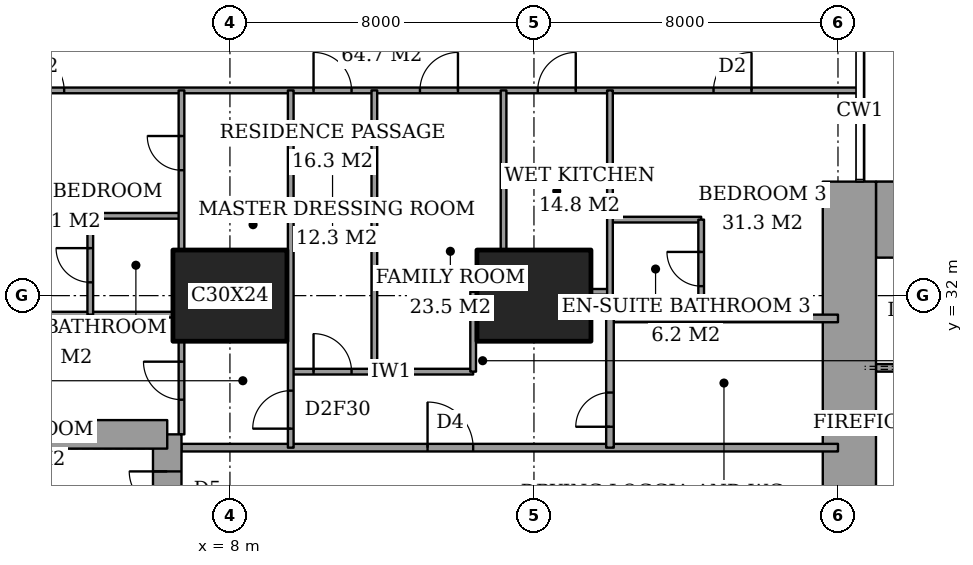
"""IFC4 building model, lengths in metres.
Left out: names, types, materials, properties, quantities, classifications, styles, units other than length and angle.
Written with IfcOpenShell. Run it as: python <this file> out.ifc"""

import sys

from ifc_helpers import new_model, si_unit, direction, frame, frame_2d, origin, origin_2d, place, context, subcontext, project, spatial, rectangle, extrude, element, fill, save


model = new_model("IFC4")
c1 = context("Model", 3, precision=1e-05, world=origin(), true_north=direction((0.0, 1.0)))
c2 = subcontext(c1, "Body", "Model", "MODEL_VIEW")
j1 = project(units=[si_unit("LENGTHUNIT", "METRE"), si_unit("PLANEANGLEUNIT", "RADIAN")], contexts=[c1])
p1 = place(None, origin())
s1 = spatial("IfcSite", under=j1, at=p1, CompositionType="ELEMENT")
p2 = place(p1, origin())
s2 = spatial("IfcBuilding", under=s1, at=p2, CompositionType="ELEMENT")
p3 = place(p2, frame((0.0, 0.0, 143.0)))
s3 = spatial("IfcBuildingStorey", under=s2, at=p3, CompositionType="ELEMENT", Elevation=143.0)
for number, where, z_axis, x_axis in (
    (1, (8.0, 32.0, 0.0), (0.0, 0.0, 1.0), (1.0, 0.0, 0.0)),
    (2, (16.0, 32.0, 0.0), (0.0, 0.0, 1.0), (1.0, 0.0, 0.0)),
):
    element("IfcColumn", number, at=place(p3, frame(where, z_axis=z_axis, x_axis=x_axis)), inside=s3, PredefinedType="COLUMN", context=c2, shape_type="SweptSolid", body=[
        extrude(rectangle(XDim=3.0, YDim=2.4, at=origin_2d()), origin(), (0.0, 0.0, 1.0), 3.6),
    ])
p4 = place(p3, frame((25.0, 34.0, 0.0), z_axis=(0.0, 0.0, 1.0), x_axis=(1.0, 0.0, 0.0)))
e3 = element("IfcWall", 3, at=p4, inside=s3, PredefinedType="SHEAR", context=c2, shape_type="SweptSolid", body=[
    extrude(rectangle(XDim=3.15, YDim=2.0, at=frame_2d((1.575, 0.0))), origin(), (0.0, 0.0, 1.0), 3.6),
])
p5 = place(p3, frame((24.3, 23.15, 0.0), z_axis=(0.0, 0.0, 1.0), x_axis=(0.0, 1.0, 0.0)))
e4 = element("IfcWall", 4, at=p5, inside=s3, PredefinedType="SHEAR", context=c2, shape_type="SweptSolid", body=[
    extrude(rectangle(XDim=11.85, YDim=1.4, at=frame_2d((5.925, 0.0))), origin(), (0.0, 0.0, 1.0), 3.6),
])
p6 = place(p5, frame((0.75, 0.0, 0.0)))
e5 = element("IfcOpeningElement", 5, at=p6, cuts=e4, PredefinedType="OPENING", context=c2, shape_type="SweptSolid", body=[
    extrude(rectangle(XDim=1.8, YDim=2.4, at=frame_2d((0.9, 1.2))), frame((0.0, 0.71, 0.0), z_axis=(0.0, -1.0, 0.0), x_axis=(1.0, 0.0, 0.0)), (0.0, 0.0, 1.0), 1.42),
])
p7 = place(p3, frame((6.35, 19.65, 0.0), z_axis=(0.0, 0.0, 1.0), x_axis=(0.0, 1.0, 0.0)))
e6 = element("IfcWall", 6, at=p7, inside=s3, PredefinedType="SHEAR", context=c2, shape_type="SweptSolid", body=[
    extrude(rectangle(XDim=8.7, YDim=0.75, at=frame_2d((4.35, 0.0))), origin(), (0.0, 0.0, 1.0), 3.6),
])
p8 = place(p7, frame((6.725, 0.0, 0.0)))
e7 = element("IfcOpeningElement", 7, at=p8, cuts=e6, PredefinedType="OPENING", context=c2, shape_type="SweptSolid", body=[
    extrude(rectangle(XDim=1.0, YDim=2.1, at=frame_2d((0.5, 1.05))), frame((0.0, 0.385, 0.0), z_axis=(0.0, -1.0, 0.0), x_axis=(1.0, 0.0, 0.0)), (0.0, 0.0, 1.0), 0.77),
])
p9 = place(p3, frame((6.35, 28.35, 0.0), z_axis=(0.0, 0.0, 1.0), x_axis=(-1.0, 0.0, 0.0)))
e8 = element("IfcWall", 8, at=p9, inside=s3, PredefinedType="SHEAR", context=c2, shape_type="SweptSolid", body=[
    extrude(rectangle(XDim=4.45, YDim=0.75, at=frame_2d((2.225, 0.0))), origin(), (0.0, 0.0, 1.0), 3.6),
])
p10 = place(p3, frame((6.725, 28.0, 0.0), z_axis=(0.0, 0.0, 1.0), x_axis=(1.0, 0.0, 0.0)))
e9 = element("IfcWall", 9, at=p10, inside=s3, PredefinedType="PARTITIONING", context=c2, shape_type="SweptSolid", body=[
    extrude(rectangle(XDim=17.275, YDim=0.2, at=frame_2d((8.637, 0.0))), origin(), (0.0, 0.0, 1.0), 3.35),
])
p11 = place(p10, frame((6.475, 0.0, 0.0)))
e10 = element("IfcOpeningElement", 10, at=p11, cuts=e9, PredefinedType="OPENING", context=c2, shape_type="SweptSolid", body=[
    extrude(rectangle(XDim=1.2, YDim=2.4, at=frame_2d((0.6, 1.2))), frame((0.0, 0.11, 0.0), z_axis=(0.0, -1.0, 0.0), x_axis=(1.0, 0.0, 0.0)), (0.0, 0.0, 1.0), 0.22),
])
p12 = place(p3, frame((9.6, 30.0, 0.0), z_axis=(0.0, 0.0, 1.0), x_axis=(1.0, 0.0, 0.0)))
e11 = element("IfcWall", 11, at=p12, inside=s3, PredefinedType="PARTITIONING", context=c2, shape_type="SweptSolid", body=[
    extrude(rectangle(XDim=4.8, YDim=0.15, at=frame_2d((2.4, 0.0))), origin(), (0.0, 0.0, 1.0), 3.35),
])
p13 = place(p12, frame((0.6, 0.0, 0.0)))
e12 = element("IfcOpeningElement", 12, at=p13, cuts=e11, PredefinedType="OPENING", context=c2, shape_type="SweptSolid", body=[
    extrude(rectangle(XDim=1.0, YDim=2.1, at=frame_2d((0.5, 1.05))), frame((0.0, 0.085, 0.0), z_axis=(0.0, -1.0, 0.0), x_axis=(1.0, 0.0, 0.0)), (0.0, 0.0, 1.0), 0.17),
])
p14 = place(p3, frame((18.0, 31.4, 0.0), z_axis=(0.0, 0.0, 1.0), x_axis=(1.0, 0.0, 0.0)))
e13 = element("IfcWall", 13, at=p14, inside=s3, PredefinedType="PARTITIONING", context=c2, shape_type="SweptSolid", body=[
    extrude(rectangle(XDim=6.0, YDim=0.2, at=frame_2d((3.0, 0.0))), origin(), (0.0, 0.0, 1.0), 3.35),
])
p15 = place(p3, frame((1.35, 31.5, 0.0), z_axis=(0.0, 0.0, 1.0), x_axis=(1.0, 0.0, 0.0)))
e14 = element("IfcWall", 14, at=p15, inside=s3, PredefinedType="PARTITIONING", context=c2, shape_type="SweptSolid", body=[
    extrude(rectangle(XDim=5.15, YDim=0.15, at=frame_2d((2.575, 0.0))), origin(), (0.0, 0.0, 1.0), 3.35),
])
p16 = place(p3, frame((17.5, 32.1, 0.0), z_axis=(0.0, 0.0, 1.0), x_axis=(1.0, 0.0, 0.0)))
e15 = element("IfcWall", 15, at=p16, inside=s3, PredefinedType="PARTITIONING", context=c2, shape_type="SweptSolid", body=[
    extrude(rectangle(XDim=0.5, YDim=0.15, at=frame_2d((0.25, 0.0))), origin(), (0.0, 0.0, 1.0), 2.634),
])
p17 = place(p3, frame((18.0, 34.0, 0.0), z_axis=(0.0, 0.0, 1.0), x_axis=(1.0, 0.0, 0.0)))
e16 = element("IfcWall", 16, at=p17, inside=s3, PredefinedType="PARTITIONING", context=c2, shape_type="SweptSolid", body=[
    extrude(rectangle(XDim=2.4, YDim=0.15, at=frame_2d((1.2, 0.0))), origin(), (0.0, 0.0, 1.0), 3.35),
])
p18 = place(p3, frame((4.325, 34.1, 0.0), z_axis=(0.0, 0.0, 1.0), x_axis=(1.0, 0.0, 0.0)))
e17 = element("IfcWall", 17, at=p18, inside=s3, PredefinedType="PARTITIONING", context=c2, shape_type="SweptSolid", body=[
    extrude(rectangle(XDim=2.4, YDim=0.15, at=frame_2d((1.2, 0.0))), origin(), (0.0, 0.0, 1.0), 3.35),
])
p19 = place(p3, frame((-0.45, 37.4, 0.0), z_axis=(0.0, 0.0, 1.0), x_axis=(1.0, 0.0, 0.0)))
e18 = element("IfcWall", 18, at=p19, inside=s3, PredefinedType="PARTITIONING", context=c2, shape_type="SweptSolid", body=[
    extrude(rectangle(XDim=25.011, YDim=0.15, at=frame_2d((12.505, 0.0))), origin(), (0.0, 0.0, 1.0), 3.35),
])
p20 = place(p19, frame((10.65, 0.0, 0.0)))
e19 = element("IfcOpeningElement", 19, at=p20, cuts=e18, PredefinedType="OPENING", context=c2, shape_type="SweptSolid", body=[
    extrude(rectangle(XDim=1.0, YDim=2.1, at=frame_2d((0.5, 1.05))), frame((0.0, 0.085, 0.0), z_axis=(0.0, -1.0, 0.0), x_axis=(1.0, 0.0, 0.0)), (0.0, 0.0, 1.0), 0.17),
])
p21 = place(p19, frame((3.087, 0.0, 0.0)))
e20 = element("IfcOpeningElement", 20, at=p21, cuts=e18, PredefinedType="OPENING", context=c2, shape_type="SweptSolid", body=[
    extrude(rectangle(XDim=1.0, YDim=2.1, at=frame_2d((0.5, 1.05))), frame((0.0, 0.085, 0.0), z_axis=(0.0, -1.0, 0.0), x_axis=(1.0, 0.0, 0.0)), (0.0, 0.0, 1.0), 0.17),
])
p22 = place(p19, frame((13.45, 0.0, 0.0)))
e21 = element("IfcOpeningElement", 21, at=p22, cuts=e18, PredefinedType="OPENING", context=c2, shape_type="SweptSolid", body=[
    extrude(rectangle(XDim=1.0, YDim=2.1, at=frame_2d((0.5, 1.05))), frame((0.0, 0.085, 0.0), z_axis=(0.0, -1.0, 0.0), x_axis=(1.0, 0.0, 0.0)), (0.0, 0.0, 1.0), 0.17),
])
p23 = place(p19, frame((16.55, 0.0, 0.0)))
e22 = element("IfcOpeningElement", 22, at=p23, cuts=e18, PredefinedType="OPENING", context=c2, shape_type="SweptSolid", body=[
    extrude(rectangle(XDim=1.0, YDim=2.1, at=frame_2d((0.5, 1.05))), frame((0.0, 0.085, 0.0), z_axis=(0.0, -1.0, 0.0), x_axis=(1.0, 0.0, 0.0)), (0.0, 0.0, 1.0), 0.17),
])
p24 = place(p19, frame((21.175, 0.0, 0.0)))
e23 = element("IfcOpeningElement", 23, at=p24, cuts=e18, PredefinedType="OPENING", context=c2, shape_type="SweptSolid", body=[
    extrude(rectangle(XDim=1.0, YDim=2.1, at=frame_2d((0.5, 1.05))), frame((0.0, 0.085, 0.0), z_axis=(0.0, -1.0, 0.0), x_axis=(1.0, 0.0, 0.0)), (0.0, 0.0, 1.0), 0.17),
])
p25 = place(p3, frame((4.325, 31.5, 0.0), z_axis=(0.0, 0.0, 1.0), x_axis=(0.0, 1.0, 0.0)))
e24 = element("IfcWall", 24, at=p25, inside=s3, PredefinedType="PARTITIONING", context=c2, shape_type="SweptSolid", body=[
    extrude(rectangle(XDim=2.6, YDim=0.15, at=frame_2d((1.3, 0.0))), origin(), (0.0, 0.0, 1.0), 3.35),
])
p26 = place(p25, frame((0.85, 0.0, 0.0)))
e25 = element("IfcOpeningElement", 25, at=p26, cuts=e24, PredefinedType="OPENING", context=c2, shape_type="SweptSolid", body=[
    extrude(rectangle(XDim=0.9, YDim=2.1, at=frame_2d((0.45, 1.05))), frame((0.0, 0.085, 0.0), z_axis=(0.0, -1.0, 0.0), x_axis=(1.0, 0.0, 0.0)), (0.0, 0.0, 1.0), 0.17),
])
p27 = place(p3, frame((6.725, 28.35, 0.0), z_axis=(0.0, 0.0, 1.0), x_axis=(0.0, 1.0, 0.0)))
e26 = element("IfcWall", 26, at=p27, inside=s3, PredefinedType="PARTITIONING", context=c2, shape_type="SweptSolid", body=[
    extrude(rectangle(XDim=2.45, YDim=0.15, at=frame_2d((1.225, 0.0))), origin(), (0.0, 0.0, 1.0), 3.35),
])
p28 = place(p27, frame((0.913, 0.0, 0.0)))
e27 = element("IfcOpeningElement", 27, at=p28, cuts=e26, PredefinedType="OPENING", context=c2, shape_type="SweptSolid", body=[
    extrude(rectangle(XDim=1.0, YDim=2.1, at=frame_2d((0.5, 1.05))), frame((0.0, 0.085, 0.0), z_axis=(0.0, -1.0, 0.0), x_axis=(1.0, 0.0, 0.0)), (0.0, 0.0, 1.0), 0.17),
])
p29 = place(p3, frame((6.725, 33.2, 0.0), z_axis=(0.0, 0.0, 1.0), x_axis=(0.0, 1.0, 0.0)))
e28 = element("IfcWall", 28, at=p29, inside=s3, PredefinedType="PARTITIONING", context=c2, shape_type="SweptSolid", body=[
    extrude(rectangle(XDim=4.2, YDim=0.15, at=frame_2d((2.1, 0.0))), origin(), (0.0, 0.0, 1.0), 3.35),
])
p30 = place(p29, frame((2.1, 0.0, 0.0)))
e29 = element("IfcOpeningElement", 29, at=p30, cuts=e28, PredefinedType="OPENING", context=c2, shape_type="SweptSolid", body=[
    extrude(rectangle(XDim=0.9, YDim=2.1, at=frame_2d((0.45, 1.05))), frame((0.0, 0.085, 0.0), z_axis=(0.0, -1.0, 0.0), x_axis=(1.0, 0.0, 0.0)), (0.0, 0.0, 1.0), 0.17),
])
p31 = place(p3, frame((9.6, 28.0, 0.0), z_axis=(0.0, 0.0, 1.0), x_axis=(0.0, 1.0, 0.0)))
e30 = element("IfcWall", 30, at=p31, inside=s3, PredefinedType="PARTITIONING", context=c2, shape_type="SweptSolid", body=[
    extrude(rectangle(XDim=9.4, YDim=0.15, at=frame_2d((4.7, 0.0))), origin(), (0.0, 0.0, 1.0), 3.35),
])
p32 = place(p31, frame((0.5, 0.0, 0.0)))
e31 = element("IfcOpeningElement", 31, at=p32, cuts=e30, PredefinedType="OPENING", context=c2, shape_type="SweptSolid", body=[
    extrude(rectangle(XDim=1.0, YDim=2.1, at=frame_2d((0.5, 1.05))), frame((0.0, 0.085, 0.0), z_axis=(0.0, -1.0, 0.0), x_axis=(1.0, 0.0, 0.0)), (0.0, 0.0, 1.0), 0.17),
])
p33 = place(p3, frame((11.8, 30.0, 0.0), z_axis=(0.0, 0.0, 1.0), x_axis=(0.0, 1.0, 0.0)))
e32 = element("IfcWall", 32, at=p33, inside=s3, PredefinedType="PARTITIONING", context=c2, shape_type="SweptSolid", body=[
    extrude(rectangle(XDim=7.4, YDim=0.15, at=frame_2d((3.7, 0.0))), origin(), (0.0, 0.0, 1.0), 3.35),
])
p34 = place(p3, frame((14.4, 30.0, 0.0), z_axis=(0.0, 0.0, 1.0), x_axis=(0.0, 1.0, 0.0)))
e33 = element("IfcWall", 33, at=p34, inside=s3, PredefinedType="PARTITIONING", context=c2, shape_type="SweptSolid", body=[
    extrude(rectangle(XDim=2.1, YDim=0.15, at=frame_2d((1.05, 0.0))), origin(), (0.0, 0.0, 1.0), 3.35),
])
p35 = place(p3, frame((15.2, 33.2, 0.0), z_axis=(0.0, 0.0, 1.0), x_axis=(0.0, 1.0, 0.0)))
e34 = element("IfcWall", 34, at=p35, inside=s3, PredefinedType="PARTITIONING", context=c2, shape_type="SweptSolid", body=[
    extrude(rectangle(XDim=4.2, YDim=0.15, at=frame_2d((2.1, 0.0))), origin(), (0.0, 0.0, 1.0), 3.35),
])
p36 = place(p3, frame((18.0, 28.0, 0.0), z_axis=(0.0, 0.0, 1.0), x_axis=(0.0, 1.0, 0.0)))
e35 = element("IfcWall", 35, at=p36, inside=s3, PredefinedType="PARTITIONING", context=c2, shape_type="SweptSolid", body=[
    extrude(rectangle(XDim=3.4, YDim=0.2, at=frame_2d((1.7, 0.0))), origin(), (0.0, 0.0, 1.0), 3.35),
])
p37 = place(p36, frame((0.55, 0.0, 0.0)))
e36 = element("IfcOpeningElement", 36, at=p37, cuts=e35, PredefinedType="OPENING", context=c2, shape_type="SweptSolid", body=[
    extrude(rectangle(XDim=0.9, YDim=2.1, at=frame_2d((0.45, 1.05))), frame((0.0, 0.11, 0.0), z_axis=(0.0, -1.0, 0.0), x_axis=(1.0, 0.0, 0.0)), (0.0, 0.0, 1.0), 0.22),
])
p38 = place(p3, frame((18.0, 31.4, 0.0), z_axis=(0.0, 0.0, 1.0), x_axis=(0.0, 1.0, 0.0)))
e37 = element("IfcWall", 37, at=p38, inside=s3, PredefinedType="PARTITIONING", context=c2, shape_type="SweptSolid", body=[
    extrude(rectangle(XDim=6.0, YDim=0.15, at=frame_2d((3.0, 0.0))), origin(), (0.0, 0.0, 1.0), 3.35),
])
p39 = place(p3, frame((20.4, 31.4, 0.0), z_axis=(0.0, 0.0, 1.0), x_axis=(0.0, 1.0, 0.0)))
e38 = element("IfcWall", 38, at=p39, inside=s3, PredefinedType="PARTITIONING", context=c2, shape_type="SweptSolid", body=[
    extrude(rectangle(XDim=2.6, YDim=0.15, at=frame_2d((1.3, 0.0))), origin(), (0.0, 0.0, 1.0), 3.35),
])
p40 = place(p39, frame((0.85, 0.0, 0.0)))
e39 = element("IfcOpeningElement", 39, at=p40, cuts=e38, PredefinedType="OPENING", context=c2, shape_type="SweptSolid", body=[
    extrude(rectangle(XDim=0.9, YDim=2.1, at=frame_2d((0.45, 1.05))), frame((0.0, 0.085, 0.0), z_axis=(0.0, -1.0, 0.0), x_axis=(1.0, 0.0, 0.0)), (0.0, 0.0, 1.0), 0.17),
])
p41 = place(p3, frame((25.0, 30.1, 0.0), z_axis=(0.0, 0.0, 1.0), x_axis=(1.0, 0.0, 0.0)))
e40 = element("IfcWall", 40, at=p41, inside=s3, PredefinedType="PARTITIONING", context=c2, shape_type="SweptSolid", body=[
    extrude(rectangle(XDim=12.7, YDim=0.2, at=frame_2d((6.35, 0.0))), origin(), (0.0, 0.0, 1.0), 3.6),
])
p42 = place(p41, frame((0.9, 0.0, 0.0)))
e41 = element("IfcOpeningElement", 41, at=p42, cuts=e40, PredefinedType="OPENING", context=c2, shape_type="SweptSolid", body=[
    extrude(rectangle(XDim=1.2, YDim=2.1, at=frame_2d((0.6, 1.05))), frame((0.0, 0.11, 0.0), z_axis=(0.0, -1.0, 0.0), x_axis=(1.0, 0.0, 0.0)), (0.0, 0.0, 1.0), 0.22),
])
p43 = place(p20, origin())
e42 = element("IfcDoor", 42, at=p43, inside=s3, OperationType="SINGLE_SWING_RIGHT", PredefinedType="DOOR", context=c2, shape_type="SweptSolid", body=[
    extrude(rectangle(XDim=1.0, YDim=2.1, at=frame_2d((0.5, 1.05))), frame((0.0, 0.025, 0.0), z_axis=(0.0, -1.0, 0.0), x_axis=(1.0, 0.0, 0.0)), (0.0, 0.0, 1.0), 0.05),
])
fill(e19, e42)
p44 = place(p26, origin())
e43 = element("IfcDoor", 43, at=p44, inside=s3, OperationType="SINGLE_SWING_LEFT", PredefinedType="DOOR", context=c2, shape_type="SweptSolid", body=[
    extrude(rectangle(XDim=0.9, YDim=2.1, at=frame_2d((0.45, 1.05))), frame((0.0, 0.025, 0.0), z_axis=(0.0, -1.0, 0.0), x_axis=(1.0, 0.0, 0.0)), (0.0, 0.0, 1.0), 0.05),
])
fill(e25, e43)
p45 = place(p21, origin())
e44 = element("IfcDoor", 44, at=p45, inside=s3, OperationType="SINGLE_SWING_RIGHT", PredefinedType="DOOR", context=c2, shape_type="SweptSolid", body=[
    extrude(rectangle(XDim=1.0, YDim=2.1, at=frame_2d((0.5, 1.05))), frame((0.0, 0.025, 0.0), z_axis=(0.0, -1.0, 0.0), x_axis=(1.0, 0.0, 0.0)), (0.0, 0.0, 1.0), 0.05),
])
fill(e20, e44)
p46 = place(p28, origin())
e45 = element("IfcDoor", 45, at=p46, inside=s3, OperationType="SINGLE_SWING_LEFT", PredefinedType="DOOR", context=c2, shape_type="SweptSolid", body=[
    extrude(rectangle(XDim=1.0, YDim=2.1, at=frame_2d((0.5, 1.05))), frame((0.0, 0.025, 0.0), z_axis=(0.0, -1.0, 0.0), x_axis=(1.0, 0.0, 0.0)), (0.0, 0.0, 1.0), 0.05),
])
fill(e27, e45)
p47 = place(p30, origin())
e46 = element("IfcDoor", 46, at=p47, inside=s3, OperationType="SINGLE_SWING_LEFT", PredefinedType="DOOR", context=c2, shape_type="SweptSolid", body=[
    extrude(rectangle(XDim=0.9, YDim=2.1, at=frame_2d((0.45, 1.05))), frame((0.0, 0.025, 0.0), z_axis=(0.0, -1.0, 0.0), x_axis=(1.0, 0.0, 0.0)), (0.0, 0.0, 1.0), 0.05),
])
fill(e29, e46)
p48 = place(p32, origin())
e47 = element("IfcDoor", 47, at=p48, inside=s3, OperationType="SINGLE_SWING_RIGHT", PredefinedType="DOOR", context=c2, shape_type="SweptSolid", body=[
    extrude(rectangle(XDim=1.0, YDim=2.1, at=frame_2d((0.5, 1.05))), frame((0.0, 0.025, 0.0), z_axis=(0.0, -1.0, 0.0), x_axis=(1.0, 0.0, 0.0)), (0.0, 0.0, 1.0), 0.05),
])
fill(e31, e47)
p49 = place(p11, origin())
e48 = element("IfcDoor", 48, at=p49, inside=s3, OperationType="SINGLE_SWING_RIGHT", PredefinedType="DOOR", context=c2, shape_type="SweptSolid", body=[
    extrude(rectangle(XDim=1.2, YDim=2.4, at=frame_2d((0.6, 1.2))), frame((0.0, 0.025, 0.0), z_axis=(0.0, -1.0, 0.0), x_axis=(1.0, 0.0, 0.0)), (0.0, 0.0, 1.0), 0.05),
])
fill(e10, e48)
p50 = place(p13, origin())
e49 = element("IfcDoor", 49, at=p50, inside=s3, OperationType="SINGLE_SWING_RIGHT", PredefinedType="DOOR", context=c2, shape_type="SweptSolid", body=[
    extrude(rectangle(XDim=1.0, YDim=2.1, at=frame_2d((0.5, 1.05))), frame((0.0, 0.025, 0.0), z_axis=(0.0, -1.0, 0.0), x_axis=(1.0, 0.0, 0.0)), (0.0, 0.0, 1.0), 0.05),
])
fill(e12, e49)
p51 = place(p22, origin())
e50 = element("IfcDoor", 50, at=p51, inside=s3, OperationType="SINGLE_SWING_LEFT", PredefinedType="DOOR", context=c2, shape_type="SweptSolid", body=[
    extrude(rectangle(XDim=1.0, YDim=2.1, at=frame_2d((0.5, 1.05))), frame((0.0, 0.025, 0.0), z_axis=(0.0, -1.0, 0.0), x_axis=(1.0, 0.0, 0.0)), (0.0, 0.0, 1.0), 0.05),
])
fill(e21, e50)
p52 = place(p23, origin())
e51 = element("IfcDoor", 51, at=p52, inside=s3, OperationType="SINGLE_SWING_LEFT", PredefinedType="DOOR", context=c2, shape_type="SweptSolid", body=[
    extrude(rectangle(XDim=1.0, YDim=2.1, at=frame_2d((0.5, 1.05))), frame((0.0, 0.025, 0.0), z_axis=(0.0, -1.0, 0.0), x_axis=(1.0, 0.0, 0.0)), (0.0, 0.0, 1.0), 0.05),
])
fill(e22, e51)
p53 = place(p40, origin())
e52 = element("IfcDoor", 52, at=p53, inside=s3, OperationType="SINGLE_SWING_LEFT", PredefinedType="DOOR", context=c2, shape_type="SweptSolid", body=[
    extrude(rectangle(XDim=0.9, YDim=2.1, at=frame_2d((0.45, 1.05))), frame((0.0, 0.025, 0.0), z_axis=(0.0, -1.0, 0.0), x_axis=(1.0, 0.0, 0.0)), (0.0, 0.0, 1.0), 0.05),
])
fill(e39, e52)
p54 = place(p24, origin())
e53 = element("IfcDoor", 53, at=p54, inside=s3, OperationType="SINGLE_SWING_LEFT", PredefinedType="DOOR", context=c2, shape_type="SweptSolid", body=[
    extrude(rectangle(XDim=1.0, YDim=2.1, at=frame_2d((0.5, 1.05))), frame((0.0, 0.025, 0.0), z_axis=(0.0, -1.0, 0.0), x_axis=(1.0, 0.0, 0.0)), (0.0, 0.0, 1.0), 0.05),
])
fill(e23, e53)
p55 = place(p37, origin())
e54 = element("IfcDoor", 54, at=p55, inside=s3, OperationType="SINGLE_SWING_RIGHT", PredefinedType="DOOR", context=c2, shape_type="SweptSolid", body=[
    extrude(rectangle(XDim=0.9, YDim=2.1, at=frame_2d((0.45, 1.05))), frame((0.0, 0.025, 0.0), z_axis=(0.0, -1.0, 0.0), x_axis=(1.0, 0.0, 0.0)), (0.0, 0.0, 1.0), 0.05),
])
fill(e36, e54)
p56 = place(p8, origin())
e55 = element("IfcDoor", 55, at=p56, inside=s3, OperationType="SINGLE_SWING_LEFT", PredefinedType="DOOR", context=c2, shape_type="SweptSolid", body=[
    extrude(rectangle(XDim=1.0, YDim=2.1, at=frame_2d((0.5, 1.05))), frame((0.0, 0.025, 0.0), z_axis=(0.0, -1.0, 0.0), x_axis=(1.0, 0.0, 0.0)), (0.0, 0.0, 1.0), 0.05),
])
fill(e7, e55)
save(model, sys.argv[1])
